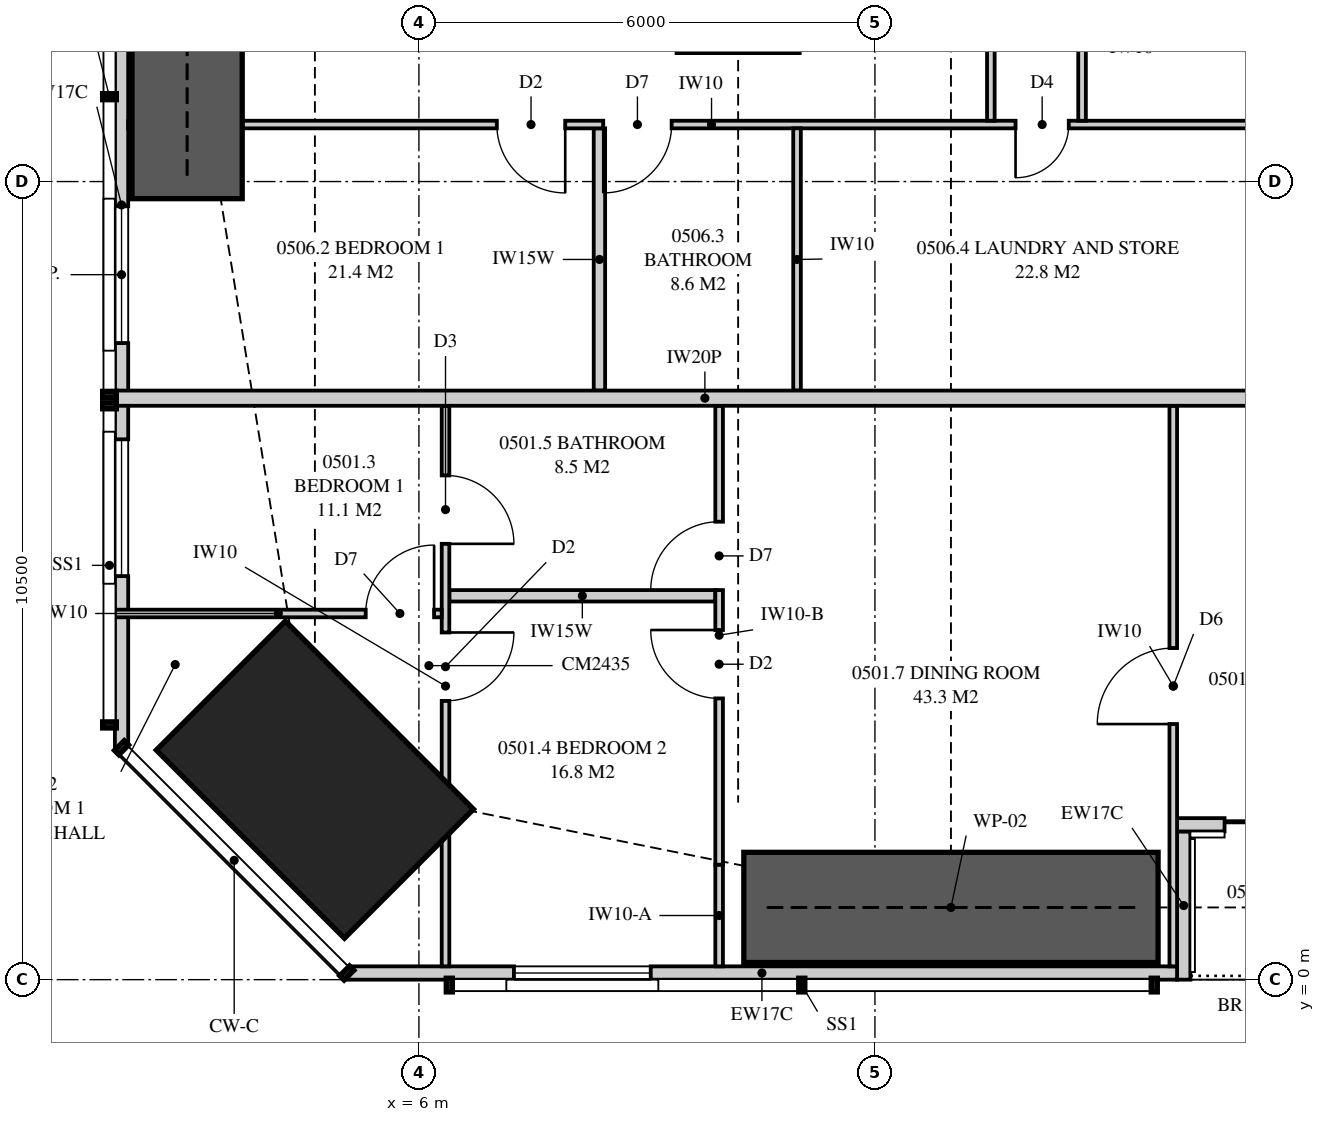
"""IFC4 building model, lengths in metres.
Left out: names, types, materials, properties, quantities, classifications, styles, units other than length and angle.
Written with IfcOpenShell. Run it as: python <this file> out.ifc"""

import sys

from ifc_helpers import new_model, si_unit, direction, frame, frame_2d, origin, origin_2d, place, context, subcontext, project, spatial, polyline, rectangle, outline, extrude, element, fill, save


model = new_model("IFC4")
c1 = context("Model", 3, precision=1e-05, world=origin(), true_north=direction((0.0, 1.0)))
c2 = subcontext(c1, "Body", "Model", "MODEL_VIEW")
j1 = project(units=[si_unit("LENGTHUNIT", "METRE"), si_unit("PLANEANGLEUNIT", "RADIAN")], contexts=[c1])
p1 = place(None, origin())
s1 = spatial("IfcSite", under=j1, at=p1, CompositionType="ELEMENT")
p2 = place(p1, origin())
s2 = spatial("IfcBuilding", under=s1, at=p2, CompositionType="ELEMENT")
p3 = place(p2, frame((0.0, 0.0, 24.35)))
s3 = spatial("IfcBuildingStorey", under=s2, at=p3, CompositionType="ELEMENT", Elevation=24.35)
p4 = place(p3, frame((4.631, 2.631, 0.0), z_axis=(0.0, 0.0, 1.0), x_axis=(0.707106781187, 0.707106781187, 0.0)))
e1 = element("IfcColumn", 1, at=p4, inside=s3, PredefinedType="COLUMN", context=c2, shape_type="SweptSolid", body=[
    extrude(rectangle(XDim=2.4, YDim=3.5, at=origin_2d()), origin(), (0.0, 0.0, 1.0), 3.35),
])
p5 = place(p3, frame((5.051, 0.087, 0.0), z_axis=(0.0, 0.0, 1.0), x_axis=(1.0, 0.0, 0.0)))
e2 = element("IfcWall", 2, at=p5, inside=s3, PredefinedType="SOLIDWALL", context=c2, shape_type="SweptSolid", body=[
    extrude(outline(polyline([(0.0, 0.0), (10.924, 0.0), (10.924, 2.15), (7.949, 2.15), (7.949, 3.11), (7.793, 3.11), (7.793, 2.15), (7.745, 2.15), (7.745, 3.11), (0.0, 3.11), (0.0, 0.0)])), frame((0.0, 0.087, 0.0), z_axis=(0.0, -1.0, 0.0), x_axis=(1.0, 0.0, 0.0)), (0.0, 0.0, 1.0), 0.175),
])
p6 = place(p5, frame((2.199, 0.0, 0.4)))
e3 = element("IfcOpeningElement", 3, at=p6, cuts=e2, PredefinedType="OPENING", context=c2, shape_type="SweptSolid", body=[
    extrude(rectangle(XDim=1.8, YDim=1.7, at=frame_2d((0.9, 0.85))), frame((0.0, 0.097, 0.0), z_axis=(0.0, -1.0, 0.0), x_axis=(1.0, 0.0, 0.0)), (0.0, 0.0, 1.0), 0.195),
])
p7 = place(p3, frame((15.975, 2.038, 0.0), z_axis=(0.0, 0.0, 1.0), x_axis=(1.0, 0.0, 0.0)))
e4 = element("IfcWall", 4, at=p7, inside=s3, PredefinedType="SOLIDWALL", context=c2, shape_type="SweptSolid", body=[
    extrude(rectangle(XDim=3.05, YDim=0.175, at=frame_2d((1.525, 0.0))), origin(), (0.0, 0.0, 1.0), 3.11),
])
p8 = place(p7, frame((0.625, 0.0, 0.0)))
e5 = element("IfcOpeningElement", 5, at=p8, cuts=e4, PredefinedType="OPENING", context=c2, shape_type="SweptSolid", body=[
    extrude(rectangle(XDim=1.8, YDim=2.1, at=frame_2d((0.9, 1.05))), frame((0.0, 0.097, 0.0), z_axis=(0.0, -1.0, 0.0), x_axis=(1.0, 0.0, 0.0)), (0.0, 0.0, 1.0), 0.195),
])
p9 = place(p3, frame((16.062, 0.0, 0.0), z_axis=(0.0, 0.0, 1.0), x_axis=(0.0, 1.0, 0.0)))
e6 = element("IfcWall", 6, at=p9, inside=s3, PredefinedType="SOLIDWALL", context=c2, shape_type="SweptSolid", body=[
    extrude(outline(polyline([(0.0, 0.0), (1.95, 0.0), (1.95, 3.11), (1.75, 3.11), (1.75, 2.15), (0.15, 2.15), (0.15, 3.11), (0.0, 3.11), (0.0, 0.0)])), frame((0.0, 0.087, 0.0), z_axis=(0.0, -1.0, 0.0), x_axis=(1.0, 0.0, 0.0)), (0.0, 0.0, 1.0), 0.175),
])
p10 = place(p3, frame((2.087, 17.333, 0.0), z_axis=(0.0, 0.0, 1.0), x_axis=(0.0, -1.0, 0.0)))
e7 = element("IfcWall", 7, at=p10, inside=s3, PredefinedType="SOLIDWALL", context=c2, shape_type="SweptSolid", body=[
    extrude(outline(polyline([(0.0, 0.0), (14.282, 0.0), (14.282, 3.11), (4.552, 3.11), (4.552, 2.15), (4.459, 2.15), (4.459, 3.11), (4.333, 3.11), (4.333, 2.15), (0.0, 2.15), (0.0, 0.0)])), frame((0.0, 0.087, 0.0), z_axis=(0.0, -1.0, 0.0), x_axis=(1.0, 0.0, 0.0)), (0.0, 0.0, 1.0), 0.175),
])
p11 = place(p10, frame((0.3, 0.0, 0.4)))
e8 = element("IfcOpeningElement", 8, at=p11, cuts=e7, PredefinedType="OPENING", context=c2, shape_type="SweptSolid", body=[
    extrude(rectangle(XDim=1.2, YDim=1.7, at=frame_2d((0.6, 0.85))), frame((0.0, 0.097, 0.0), z_axis=(0.0, -1.0, 0.0), x_axis=(1.0, 0.0, 0.0)), (0.0, 0.0, 1.0), 0.195),
])
p12 = place(p10, frame((7.158, 0.0, 0.4)))
e9 = element("IfcOpeningElement", 9, at=p12, cuts=e7, PredefinedType="OPENING", context=c2, shape_type="SweptSolid", body=[
    extrude(rectangle(XDim=1.8, YDim=1.7, at=frame_2d((0.9, 0.85))), frame((0.0, 0.097, 0.0), z_axis=(0.0, -1.0, 0.0), x_axis=(1.0, 0.0, 0.0)), (0.0, 0.0, 1.0), 0.195),
])
p13 = place(p10, frame((10.225, 0.0, 0.4)))
e10 = element("IfcOpeningElement", 10, at=p13, cuts=e7, PredefinedType="OPENING", context=c2, shape_type="SweptSolid", body=[
    extrude(rectangle(XDim=1.8, YDim=1.7, at=frame_2d((0.9, 0.85))), frame((0.0, 0.097, 0.0), z_axis=(0.0, -1.0, 0.0), x_axis=(1.0, 0.0, 0.0)), (0.0, 0.0, 1.0), 0.195),
])
p14 = place(p3, frame((6.35, 0.175, 0.0), z_axis=(0.0, 0.0, 1.0), x_axis=(0.0, 1.0, 0.0)))
e11 = element("IfcWall", 11, at=p14, inside=s3, PredefinedType="PARTITIONING", context=c2, shape_type="SweptSolid", body=[
    extrude(outline(polyline([(0.0, 0.0), (7.375, 0.0), (7.375, 3.11), (2.988, 3.11), (2.988, 2.15), (1.234, 2.15), (1.234, 3.11), (0.0, 3.11), (0.0, 0.0)])), frame((0.0, 0.05, 0.0), z_axis=(0.0, -1.0, 0.0), x_axis=(1.0, 0.0, 0.0)), (0.0, 0.0, 1.0), 0.1),
])
p15 = place(p14, frame((3.492, 0.0, 0.0)))
e12 = element("IfcOpeningElement", 12, at=p15, cuts=e11, PredefinedType="OPENING", context=c2, shape_type="SweptSolid", body=[
    extrude(rectangle(XDim=0.9, YDim=2.1, at=frame_2d((0.45, 1.05))), frame((0.0, 0.06, 0.0), z_axis=(0.0, -1.0, 0.0), x_axis=(1.0, 0.0, 0.0)), (0.0, 0.0, 1.0), 0.12),
])
p16 = place(p14, frame((5.559, 0.0, 0.0)))
e13 = element("IfcOpeningElement", 13, at=p16, cuts=e11, PredefinedType="OPENING", context=c2, shape_type="SweptSolid", body=[
    extrude(rectangle(XDim=0.9, YDim=2.1, at=frame_2d((0.45, 1.05))), frame((0.0, 0.06, 0.0), z_axis=(0.0, -1.0, 0.0), x_axis=(1.0, 0.0, 0.0)), (0.0, 0.0, 1.0), 0.12),
])
p17 = place(p3, frame((9.95, 0.175, 0.0), z_axis=(0.0, 0.0, 1.0), x_axis=(0.0, 1.0, 0.0)))
e14 = element("IfcWall", 14, at=p17, inside=s3, PredefinedType="PARTITIONING", context=c2, shape_type="SweptSolid", body=[
    extrude(outline(polyline([(0.0, 0.0), (1.338, 0.0), (1.338, 2.15), (0.51, 2.15), (0.51, 3.11), (0.0, 3.11), (0.0, 0.0)])), frame((0.0, 0.05, 0.0), z_axis=(0.0, -1.0, 0.0), x_axis=(1.0, 0.0, 0.0)), (0.0, 0.0, 1.0), 0.1),
])
p18 = place(p3, frame((9.95, 1.513, 0.0), z_axis=(0.0, 0.0, 1.0), x_axis=(0.0, 1.0, 0.0)))
e15 = element("IfcWall", 15, at=p18, inside=s3, PredefinedType="PARTITIONING", context=c2, shape_type="SweptSolid", body=[
    extrude(outline(polyline([(0.0, 0.0), (6.037, 0.0), (6.037, 2.51), (0.927, 2.51), (0.927, 2.15), (0.0, 2.15), (0.0, 0.0)])), frame((0.0, 0.05, 0.0), z_axis=(0.0, -1.0, 0.0), x_axis=(1.0, 0.0, 0.0)), (0.0, 0.0, 1.0), 0.1),
])
p19 = place(p18, frame((2.188, 0.0, 0.0)))
e16 = element("IfcOpeningElement", 16, at=p19, cuts=e15, PredefinedType="OPENING", context=c2, shape_type="SweptSolid", body=[
    extrude(rectangle(XDim=0.9, YDim=2.1, at=frame_2d((0.45, 1.05))), frame((0.0, 0.06, 0.0), z_axis=(0.0, -1.0, 0.0), x_axis=(1.0, 0.0, 0.0)), (0.0, 0.0, 1.0), 0.12),
])
p20 = place(p18, frame((3.612, 0.0, 0.0)))
e17 = element("IfcOpeningElement", 17, at=p20, cuts=e15, PredefinedType="OPENING", context=c2, shape_type="SweptSolid", body=[
    extrude(rectangle(XDim=0.9, YDim=2.1, at=frame_2d((0.45, 1.05))), frame((0.0, 0.06, 0.0), z_axis=(0.0, -1.0, 0.0), x_axis=(1.0, 0.0, 0.0)), (0.0, 0.0, 1.0), 0.12),
])
p21 = place(p3, frame((2.0, 4.817, 0.0), z_axis=(0.0, 0.0, 1.0), x_axis=(1.0, 0.0, 0.0)))
e18 = element("IfcWall", 18, at=p21, inside=s3, PredefinedType="PARTITIONING", context=c2, shape_type="SweptSolid", body=[
    extrude(outline(polyline([(0.0, 0.0), (4.3, 0.0), (4.3, 3.11), (3.148, 3.11), (3.148, 2.15), (1.406, 2.15), (1.406, 3.11), (0.0, 3.11), (0.0, 0.0)])), frame((0.0, 0.05, 0.0), z_axis=(0.0, -1.0, 0.0), x_axis=(1.0, 0.0, 0.0)), (0.0, 0.0, 1.0), 0.1),
])
p22 = place(p21, frame((3.3, 0.0, 0.0)))
e19 = element("IfcOpeningElement", 19, at=p22, cuts=e18, PredefinedType="OPENING", context=c2, shape_type="SweptSolid", body=[
    extrude(rectangle(XDim=0.9, YDim=2.1, at=frame_2d((0.45, 1.05))), frame((0.0, 0.06, 0.0), z_axis=(0.0, -1.0, 0.0), x_axis=(1.0, 0.0, 0.0)), (0.0, 0.0, 1.0), 0.12),
])
p23 = place(p3, frame((6.4, 5.05, 0.0), z_axis=(0.0, 0.0, 1.0), x_axis=(1.0, 0.0, 0.0)))
e20 = element("IfcWall", 20, at=p23, inside=s3, PredefinedType="PLUMBINGWALL", context=c2, shape_type="SweptSolid", body=[
    extrude(outline(polyline([(0.0, 0.0), (3.5, 0.0), (3.5, 3.11), (3.5, 2.51), (2.515, 2.51), (2.515, 3.11), (0.0, 3.11), (0.0, 0.0)])), frame((0.0, 0.075, 0.0), z_axis=(0.0, -1.0, 0.0), x_axis=(1.0, 0.0, 0.0)), (0.0, 0.0, 1.0), 0.15),
])
p24 = place(p3, frame((15.925, 0.175, 0.0), z_axis=(0.0, 0.0, 1.0), x_axis=(0.0, 1.0, 0.0)))
e21 = element("IfcWall", 21, at=p24, inside=s3, PredefinedType="PARTITIONING", context=c2, shape_type="SweptSolid", body=[
    extrude(outline(polyline([(0.0, 0.0), (7.375, 0.0), (7.375, 3.11), (1.635, 3.11), (1.635, 2.15), (0.0, 2.15), (0.0, 3.11), (0.0, 0.0)])), frame((0.0, 0.05, 0.0), z_axis=(0.0, -1.0, 0.0), x_axis=(1.0, 0.0, 0.0)), (0.0, 0.0, 1.0), 0.1),
])
p25 = place(p24, frame((3.188, 0.0, 0.0)))
e22 = element("IfcOpeningElement", 22, at=p25, cuts=e21, PredefinedType="OPENING", context=c2, shape_type="SweptSolid", body=[
    extrude(rectangle(XDim=1.0, YDim=2.1, at=frame_2d((0.5, 1.05))), frame((0.0, 0.06, 0.0), z_axis=(0.0, -1.0, 0.0), x_axis=(1.0, 0.0, 0.0)), (0.0, 0.0, 1.0), 0.12),
])
p26 = place(p3, frame((2.0, 7.65, 0.0), z_axis=(0.0, 0.0, 1.0), x_axis=(1.0, 0.0, 0.0)))
e23 = element("IfcWall", 23, at=p26, inside=s3, PredefinedType="PARTITIONING", context=c2, shape_type="SweptSolid", body=[
    extrude(outline(polyline([(0.0, 0.0), (15.525, 0.0), (15.525, 3.11), (11.337, 3.11), (11.337, 2.541), (10.663, 2.541), (10.663, 3.11), (9.51, 3.11), (9.51, 2.51), (6.89, 2.51), (6.89, 3.11), (2.969, 3.11), (2.969, 2.541), (2.74, 2.541), (2.74, 2.15), (0.896, 2.15), (0.896, 3.11), (0.0, 3.11), (0.0, 0.0)])), frame((0.0, 0.1, 0.0), z_axis=(0.0, -1.0, 0.0), x_axis=(1.0, 0.0, 0.0)), (0.0, 0.0, 1.0), 0.2),
])
p27 = place(p3, frame((2.175, 11.25, 0.0), z_axis=(0.0, 0.0, 1.0), x_axis=(1.0, 0.0, 0.0)))
e24 = element("IfcWall", 24, at=p27, inside=s3, PredefinedType="PARTITIONING", context=c2, shape_type="SweptSolid", body=[
    extrude(outline(polyline([(0.188, 3.11), (0.0, 3.11), (0.0, 0.0), (0.529, 0.0), (0.529, 0.263), (1.021, 0.263), (1.021, 0.0), (15.35, 0.0), (15.35, 3.11), (11.112, 3.11), (11.112, 2.541), (10.538, 2.541), (10.538, 3.11), (9.285, 3.11), (9.285, 2.51), (6.765, 2.51), (6.765, 3.11), (2.744, 3.11), (2.744, 2.541), (2.169, 2.541), (2.169, 3.11), (1.93, 3.11), (1.93, 2.15), (1.021, 2.15), (1.021, 1.887), (0.529, 1.887), (0.529, 2.15), (0.188, 2.15), (0.188, 3.11)])), frame((0.0, 0.05, 0.0), z_axis=(0.0, -1.0, 0.0), x_axis=(1.0, 0.0, 0.0)), (0.0, 0.0, 1.0), 0.1),
])
p28 = place(p27, frame((4.85, 0.0, 0.0)))
e25 = element("IfcOpeningElement", 25, at=p28, cuts=e24, PredefinedType="OPENING", context=c2, shape_type="SweptSolid", body=[
    extrude(rectangle(XDim=0.9, YDim=2.1, at=frame_2d((0.45, 1.05))), frame((0.0, 0.06, 0.0), z_axis=(0.0, -1.0, 0.0), x_axis=(1.0, 0.0, 0.0)), (0.0, 0.0, 1.0), 0.12),
])
p29 = place(p27, frame((6.25, 0.0, 0.0)))
e26 = element("IfcOpeningElement", 26, at=p29, cuts=e24, PredefinedType="OPENING", context=c2, shape_type="SweptSolid", body=[
    extrude(rectangle(XDim=0.9, YDim=2.1, at=frame_2d((0.45, 1.05))), frame((0.0, 0.06, 0.0), z_axis=(0.0, -1.0, 0.0), x_axis=(1.0, 0.0, 0.0)), (0.0, 0.0, 1.0), 0.12),
])
p30 = place(p27, frame((11.675, 0.0, 0.0)))
e27 = element("IfcOpeningElement", 27, at=p30, cuts=e24, PredefinedType="OPENING", context=c2, shape_type="SweptSolid", body=[
    extrude(rectangle(XDim=0.7, YDim=2.1, at=frame_2d((0.35, 1.05))), frame((0.0, 0.06, 0.0), z_axis=(0.0, -1.0, 0.0), x_axis=(1.0, 0.0, 0.0)), (0.0, 0.0, 1.0), 0.12),
])
p31 = place(p3, frame((8.375, 7.75, 0.0), z_axis=(0.0, 0.0, 1.0), x_axis=(0.0, 1.0, 0.0)))
e28 = element("IfcWall", 28, at=p31, inside=s3, PredefinedType="PLUMBINGWALL", context=c2, shape_type="SweptSolid", body=[
    extrude(rectangle(XDim=3.45, YDim=0.15, at=frame_2d((1.725, 0.0))), origin(), (0.0, 0.0, 1.0), 3.11),
])
p32 = place(p3, frame((10.975, 7.75, 0.0), z_axis=(0.0, 0.0, 1.0), x_axis=(0.0, 1.0, 0.0)))
e29 = element("IfcWall", 29, at=p32, inside=s3, PredefinedType="PARTITIONING", context=c2, shape_type="SweptSolid", body=[
    extrude(outline(polyline([(0.0, 0.0), (3.45, 0.0), (3.45, 3.11), (3.45, 2.51), (0.0, 2.51), (0.0, 3.11), (0.0, 0.0)])), frame((0.0, 0.05, 0.0), z_axis=(0.0, -1.0, 0.0), x_axis=(1.0, 0.0, 0.0)), (0.0, 0.0, 1.0), 0.1),
])
p33 = place(p3, frame((13.525, 11.3, 0.0), z_axis=(0.0, 0.0, 1.0), x_axis=(0.0, 1.0, 0.0)))
e30 = element("IfcWall", 30, at=p33, inside=s3, PredefinedType="PARTITIONING", context=c2, shape_type="SweptSolid", body=[
    extrude(outline(polyline([(0.0, 0.0), (17.95, 0.0), (17.95, 3.11), (13.987, 3.11), (13.987, 2.541), (13.413, 2.541), (13.413, 3.11), (1.987, 3.11), (1.987, 2.541), (1.413, 2.541), (1.413, 3.11), (0.0, 3.11), (0.0, 0.0)])), frame((0.0, 0.05, 0.0), z_axis=(0.0, -1.0, 0.0), x_axis=(1.0, 0.0, 0.0)), (0.0, 0.0, 1.0), 0.1),
])
p34 = place(p33, frame((6.7, 0.0, 0.0)))
e31 = element("IfcOpeningElement", 31, at=p34, cuts=e30, PredefinedType="OPENING", context=c2, shape_type="SweptSolid", body=[
    extrude(rectangle(XDim=1.0, YDim=2.1, at=frame_2d((0.5, 1.05))), frame((0.0, 0.06, 0.0), z_axis=(0.0, -1.0, 0.0), x_axis=(1.0, 0.0, 0.0)), (0.0, 0.0, 1.0), 0.12),
])
p35 = place(p3, frame((14.725, 11.3, 0.0), z_axis=(0.0, 0.0, 1.0), x_axis=(0.0, 1.0, 0.0)))
e32 = element("IfcWall", 32, at=p35, inside=s3, PredefinedType="PARTITIONING", context=c2, shape_type="SweptSolid", body=[
    extrude(outline(polyline([(0.0, 0.0), (4.15, 0.0), (4.15, 3.11), (1.987, 3.11), (1.987, 2.541), (1.413, 2.541), (1.413, 3.11), (0.0, 3.11), (0.0, 0.0)])), frame((0.0, 0.05, 0.0), z_axis=(0.0, -1.0, 0.0), x_axis=(1.0, 0.0, 0.0)), (0.0, 0.0, 1.0), 0.1),
])
for number, where, z_axis, x_axis in (
    (33, (10.275, 0.95, 0.0), (0.0, 0.0, 1.0), (1.0, 0.0, 0.0)),
    (34, (2.95, 10.275, 0.0), (0.0, 0.0, 1.0), (0.0, 1.0, 0.0)),
):
    element("IfcWall", number, at=place(p3, frame(where, z_axis=z_axis, x_axis=x_axis)), inside=s3, PredefinedType="SHEAR", context=c2, shape_type="SweptSolid", body=[
        extrude(rectangle(XDim=5.45, YDim=1.45, at=frame_2d((2.725, 0.0))), origin(), (0.0, 0.0, 1.0), 3.35),
    ])
p36 = place(p6, origin())
e35 = element("IfcWindow", 35, at=p36, inside=s3, PartitioningType="SINGLE_PANEL", PredefinedType="WINDOW", context=c2, shape_type="SweptSolid", body=[
    extrude(rectangle(XDim=1.8, YDim=1.7, at=frame_2d((0.9, 0.85))), frame((0.0, 0.03, 0.0), z_axis=(0.0, -1.0, 0.0), x_axis=(1.0, 0.0, 0.0)), (0.0, 0.0, 1.0), 0.06),
])
fill(e3, e35)
p37 = place(p8, origin())
e36 = element("IfcDoor", 36, at=p37, inside=s3, OperationType="SLIDING_TO_LEFT", PredefinedType="DOOR", context=c2, shape_type="SweptSolid", body=[
    extrude(rectangle(XDim=1.8, YDim=2.1, at=frame_2d((0.9, 1.05))), frame((0.0, 0.025, 0.0), z_axis=(0.0, -1.0, 0.0), x_axis=(1.0, 0.0, 0.0)), (0.0, 0.0, 1.0), 0.05),
])
fill(e5, e36)
p38 = place(p12, origin())
e37 = element("IfcWindow", 37, at=p38, inside=s3, PartitioningType="SINGLE_PANEL", PredefinedType="WINDOW", context=c2, shape_type="SweptSolid", body=[
    extrude(rectangle(XDim=1.8, YDim=1.7, at=frame_2d((0.9, 0.85))), frame((0.0, 0.03, 0.0), z_axis=(0.0, -1.0, 0.0), x_axis=(1.0, 0.0, 0.0)), (0.0, 0.0, 1.0), 0.06),
])
fill(e9, e37)
p39 = place(p13, origin())
e38 = element("IfcWindow", 38, at=p39, inside=s3, PartitioningType="SINGLE_PANEL", PredefinedType="WINDOW", context=c2, shape_type="SweptSolid", body=[
    extrude(rectangle(XDim=1.8, YDim=1.7, at=frame_2d((0.9, 0.85))), frame((0.0, 0.03, 0.0), z_axis=(0.0, -1.0, 0.0), x_axis=(1.0, 0.0, 0.0)), (0.0, 0.0, 1.0), 0.06),
])
fill(e10, e38)
p40 = place(p22, origin())
e39 = element("IfcDoor", 39, at=p40, inside=s3, OperationType="SINGLE_SWING_RIGHT", PredefinedType="DOOR", context=c2, shape_type="SweptSolid", body=[
    extrude(rectangle(XDim=0.9, YDim=2.1, at=frame_2d((0.45, 1.05))), frame((0.0, 0.025, 0.0), z_axis=(0.0, -1.0, 0.0), x_axis=(1.0, 0.0, 0.0)), (0.0, 0.0, 1.0), 0.05),
])
fill(e19, e39)
p41 = place(p15, frame((0.9, 0.0, 0.0), z_axis=(0.0, 0.0, 1.0), x_axis=(-1.0, 0.0, 0.0)))
e40 = element("IfcDoor", 40, at=p41, inside=s3, OperationType="SINGLE_SWING_LEFT", PredefinedType="DOOR", context=c2, shape_type="SweptSolid", body=[
    extrude(rectangle(XDim=0.9, YDim=2.1, at=frame_2d((0.45, 1.05))), frame((0.0, 0.025, 0.0), z_axis=(0.0, -1.0, 0.0), x_axis=(1.0, 0.0, 0.0)), (0.0, 0.0, 1.0), 0.05),
])
fill(e12, e40)
p42 = place(p19, origin())
e41 = element("IfcDoor", 41, at=p42, inside=s3, OperationType="SINGLE_SWING_RIGHT", PredefinedType="DOOR", context=c2, shape_type="SweptSolid", body=[
    extrude(rectangle(XDim=0.9, YDim=2.1, at=frame_2d((0.45, 1.05))), frame((0.0, 0.025, 0.0), z_axis=(0.0, -1.0, 0.0), x_axis=(1.0, 0.0, 0.0)), (0.0, 0.0, 1.0), 0.05),
])
fill(e16, e41)
p43 = place(p20, origin())
e42 = element("IfcDoor", 42, at=p43, inside=s3, OperationType="SINGLE_SWING_LEFT", PredefinedType="DOOR", context=c2, shape_type="SweptSolid", body=[
    extrude(rectangle(XDim=0.9, YDim=2.1, at=frame_2d((0.45, 1.05))), frame((0.0, 0.025, 0.0), z_axis=(0.0, -1.0, 0.0), x_axis=(1.0, 0.0, 0.0)), (0.0, 0.0, 1.0), 0.05),
])
fill(e17, e42)
p44 = place(p16, frame((0.9, 0.0, 0.0), z_axis=(0.0, 0.0, 1.0), x_axis=(-1.0, 0.0, 0.0)))
e43 = element("IfcDoor", 43, at=p44, inside=s3, OperationType="SINGLE_SWING_RIGHT", PredefinedType="DOOR", context=c2, shape_type="SweptSolid", body=[
    extrude(rectangle(XDim=0.9, YDim=2.1, at=frame_2d((0.45, 1.05))), frame((0.0, 0.025, 0.0), z_axis=(0.0, -1.0, 0.0), x_axis=(1.0, 0.0, 0.0)), (0.0, 0.0, 1.0), 0.05),
])
fill(e13, e43)
p45 = place(p25, origin())
e44 = element("IfcDoor", 44, at=p45, inside=s3, OperationType="SINGLE_SWING_LEFT", PredefinedType="DOOR", context=c2, shape_type="SweptSolid", body=[
    extrude(rectangle(XDim=1.0, YDim=2.1, at=frame_2d((0.5, 1.05))), frame((0.0, 0.025, 0.0), z_axis=(0.0, -1.0, 0.0), x_axis=(1.0, 0.0, 0.0)), (0.0, 0.0, 1.0), 0.05),
])
fill(e22, e44)
p46 = place(p28, frame((0.9, 0.0, 0.0), z_axis=(0.0, 0.0, 1.0), x_axis=(-1.0, 0.0, 0.0)))
e45 = element("IfcDoor", 45, at=p46, inside=s3, OperationType="SINGLE_SWING_LEFT", PredefinedType="DOOR", context=c2, shape_type="SweptSolid", body=[
    extrude(rectangle(XDim=0.9, YDim=2.1, at=frame_2d((0.45, 1.05))), frame((0.0, 0.025, 0.0), z_axis=(0.0, -1.0, 0.0), x_axis=(1.0, 0.0, 0.0)), (0.0, 0.0, 1.0), 0.05),
])
fill(e25, e45)
p47 = place(p29, frame((0.9, 0.0, 0.0), z_axis=(0.0, 0.0, 1.0), x_axis=(-1.0, 0.0, 0.0)))
e46 = element("IfcDoor", 46, at=p47, inside=s3, OperationType="SINGLE_SWING_RIGHT", PredefinedType="DOOR", context=c2, shape_type="SweptSolid", body=[
    extrude(rectangle(XDim=0.9, YDim=2.1, at=frame_2d((0.45, 1.05))), frame((0.0, 0.025, 0.0), z_axis=(0.0, -1.0, 0.0), x_axis=(1.0, 0.0, 0.0)), (0.0, 0.0, 1.0), 0.05),
])
fill(e26, e46)
p48 = place(p30, frame((0.7, 0.0, 0.0), z_axis=(0.0, 0.0, 1.0), x_axis=(-1.0, 0.0, 0.0)))
e47 = element("IfcDoor", 47, at=p48, inside=s3, OperationType="SINGLE_SWING_RIGHT", PredefinedType="DOOR", context=c2, shape_type="SweptSolid", body=[
    extrude(rectangle(XDim=0.7, YDim=2.1, at=frame_2d((0.35, 1.05))), frame((0.0, 0.025, 0.0), z_axis=(0.0, -1.0, 0.0), x_axis=(1.0, 0.0, 0.0)), (0.0, 0.0, 1.0), 0.05),
])
fill(e27, e47)
save(model, sys.argv[1])
